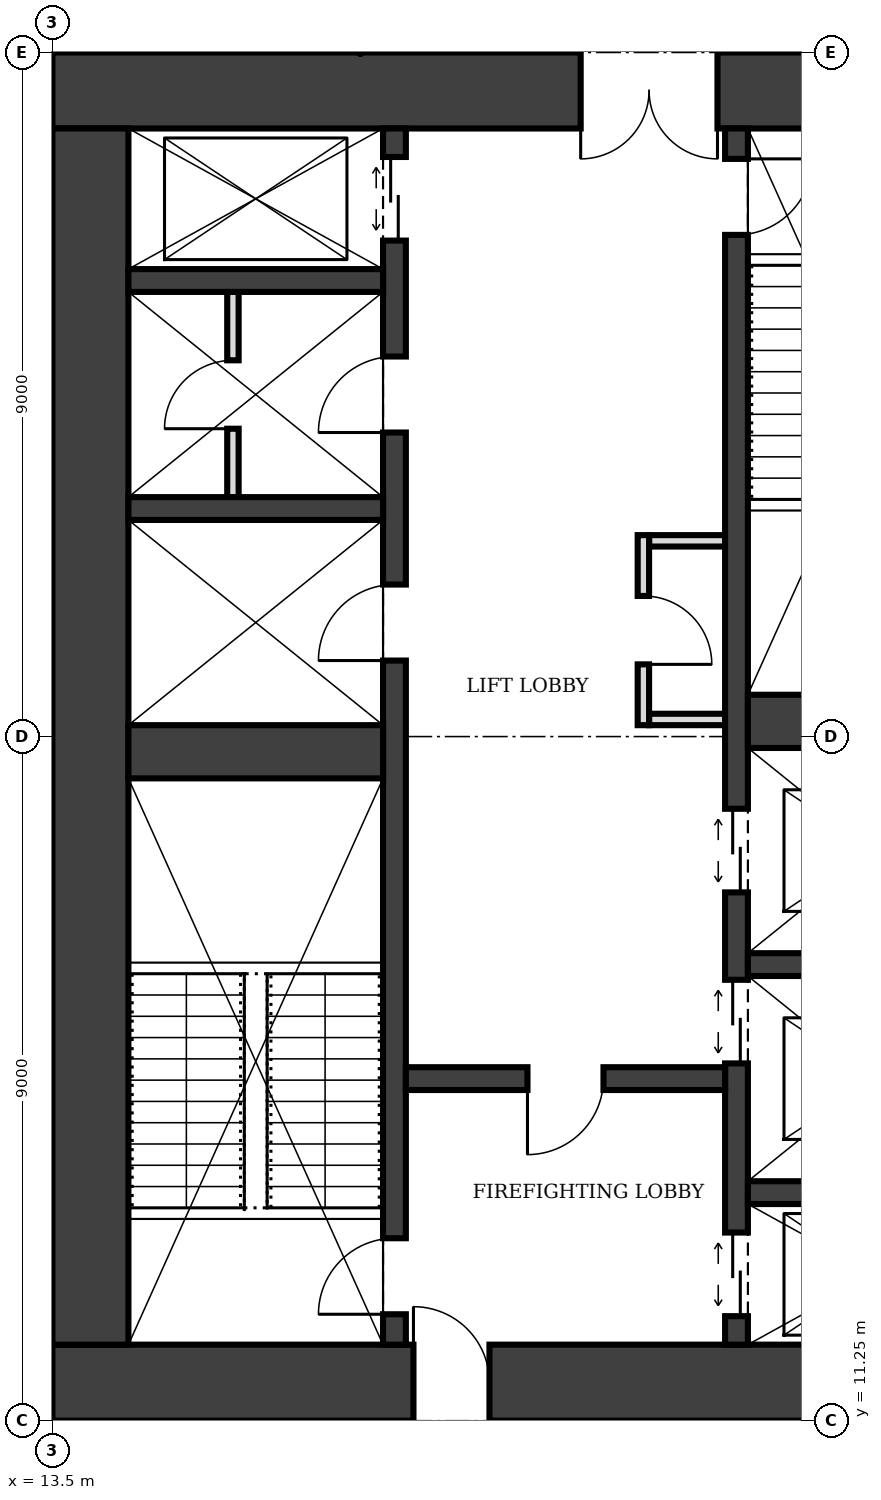
"""IFC4 building model, lengths in metres.
Left out: names, types, materials, properties, quantities, classifications, styles, units other than length and angle.
Written with IfcOpenShell. Run it as: python <this file> out.ifc"""

import sys

from ifc_helpers import new_model, si_unit, direction, frame, frame_2d, origin, place, context, subcontext, project, spatial, rectangle, extrude, element, fill, save


model = new_model("IFC4")
c1 = context("Model", 3, precision=1e-05, world=origin(), true_north=direction((0.0, 1.0)))
c2 = subcontext(c1, "Body", "Model", "MODEL_VIEW")
j1 = project(units=[si_unit("LENGTHUNIT", "METRE"), si_unit("PLANEANGLEUNIT", "RADIAN")], contexts=[c1])
p1 = place(None, origin())
s1 = spatial("IfcSite", under=j1, at=p1, CompositionType="ELEMENT")
p2 = place(p1, origin())
s2 = spatial("IfcBuilding", under=s1, at=p2, CompositionType="ELEMENT")
p3 = place(p2, frame((0.0, 0.0, 237.0)))
s3 = spatial("IfcBuildingStorey", under=s2, at=p3, CompositionType="ELEMENT", Elevation=237.0)
p4 = place(p3, frame((13.5, 11.75, 0.0), z_axis=(0.0, 0.0, 1.0), x_axis=(1.0, 0.0, 0.0)))
e1 = element("IfcWall", 1, at=p4, inside=s3, PredefinedType="SHEAR", context=c2, shape_type="SweptSolid", body=[
    extrude(rectangle(XDim=13.5, YDim=1.0, at=frame_2d((6.75, 0.0))), origin(), (0.0, 0.0, 1.0), 4.0),
])
p5 = place(p4, frame((4.75, 0.0, 0.0)))
e2 = element("IfcOpeningElement", 2, at=p5, cuts=e1, PredefinedType="OPENING", context=c2, shape_type="SweptSolid", body=[
    extrude(rectangle(XDim=1.0, YDim=2.1, at=frame_2d((0.5, 1.05))), frame((0.0, 0.51, 0.0), z_axis=(0.0, -1.0, 0.0), x_axis=(1.0, 0.0, 0.0)), (0.0, 0.0, 1.0), 1.02),
])
p6 = place(p3, frame((27.0, 28.75, 0.0), z_axis=(0.0, 0.0, 1.0), x_axis=(-1.0, 0.0, 0.0)))
e3 = element("IfcWall", 3, at=p6, inside=s3, PredefinedType="SHEAR", context=c2, shape_type="SweptSolid", body=[
    extrude(rectangle(XDim=13.5, YDim=1.0, at=frame_2d((6.75, 0.0))), origin(), (0.0, 0.0, 1.0), 4.0),
])
p7 = place(p6, frame((4.75, 0.0, 0.0)))
e4 = element("IfcOpeningElement", 4, at=p7, cuts=e3, PredefinedType="OPENING", context=c2, shape_type="SweptSolid", body=[
    extrude(rectangle(XDim=1.8, YDim=2.1, at=frame_2d((0.9, 1.05))), frame((0.0, 0.51, 0.0), z_axis=(0.0, -1.0, 0.0), x_axis=(1.0, 0.0, 0.0)), (0.0, 0.0, 1.0), 1.02),
])
p8 = place(p3, frame((14.0, 28.25, 0.0), z_axis=(0.0, 0.0, 1.0), x_axis=(0.0, -1.0, 0.0)))
e5 = element("IfcWall", 5, at=p8, inside=s3, PredefinedType="SHEAR", context=c2, shape_type="SweptSolid", body=[
    extrude(rectangle(XDim=16.0, YDim=1.0, at=frame_2d((8.0, 0.0))), origin(), (0.0, 0.0, 1.0), 4.0),
])
p9 = place(p3, frame((18.0, 12.25, 0.0), z_axis=(0.0, 0.0, 1.0), x_axis=(0.0, 1.0, 0.0)))
e6 = element("IfcWall", 6, at=p9, inside=s3, PredefinedType="SHEAR", context=c2, shape_type="SweptSolid", body=[
    extrude(rectangle(XDim=16.0, YDim=0.3, at=frame_2d((8.0, 0.0))), origin(), (0.0, 0.0, 1.0), 4.0),
])
p10 = place(p9, frame((0.4, 0.0, 0.0)))
e7 = element("IfcOpeningElement", 7, at=p10, cuts=e6, PredefinedType="OPENING", context=c2, shape_type="SweptSolid", body=[
    extrude(rectangle(XDim=1.0, YDim=2.1, at=frame_2d((0.5, 1.05))), frame((0.0, 0.16, 0.0), z_axis=(0.0, -1.0, 0.0), x_axis=(1.0, 0.0, 0.0)), (0.0, 0.0, 1.0), 0.32),
])
p11 = place(p9, frame((14.525, 0.0, 0.0)))
e8 = element("IfcOpeningElement", 8, at=p11, cuts=e6, PredefinedType="OPENING", context=c2, shape_type="SweptSolid", body=[
    extrude(rectangle(XDim=1.1, YDim=2.1, at=frame_2d((0.55, 1.05))), frame((0.0, 0.16, 0.0), z_axis=(0.0, -1.0, 0.0), x_axis=(1.0, 0.0, 0.0)), (0.0, 0.0, 1.0), 0.32),
])
p12 = place(p9, frame((9.0, 0.0, 0.0)))
e9 = element("IfcOpeningElement", 9, at=p12, cuts=e6, PredefinedType="OPENING", context=c2, shape_type="SweptSolid", body=[
    extrude(rectangle(XDim=1.0, YDim=2.1, at=frame_2d((0.5, 1.05))), frame((0.0, 0.16, 0.0), z_axis=(0.0, -1.0, 0.0), x_axis=(1.0, 0.0, 0.0)), (0.0, 0.0, 1.0), 0.32),
])
p13 = place(p9, frame((12.0, 0.0, 0.0)))
e10 = element("IfcOpeningElement", 10, at=p13, cuts=e6, PredefinedType="OPENING", context=c2, shape_type="SweptSolid", body=[
    extrude(rectangle(XDim=1.0, YDim=2.1, at=frame_2d((0.5, 1.05))), frame((0.0, 0.16, 0.0), z_axis=(0.0, -1.0, 0.0), x_axis=(1.0, 0.0, 0.0)), (0.0, 0.0, 1.0), 0.32),
])
p14 = place(p3, frame((22.5, 12.25, 0.0), z_axis=(0.0, 0.0, 1.0), x_axis=(0.0, 1.0, 0.0)))
e11 = element("IfcWall", 11, at=p14, inside=s3, PredefinedType="SHEAR", context=c2, shape_type="SweptSolid", body=[
    extrude(rectangle(XDim=16.0, YDim=0.3, at=frame_2d((8.0, 0.0))), origin(), (0.0, 0.0, 1.0), 4.0),
])
p15 = place(p14, frame((14.6, 0.0, 0.0)))
e12 = element("IfcOpeningElement", 12, at=p15, cuts=e11, PredefinedType="OPENING", context=c2, shape_type="SweptSolid", body=[
    extrude(rectangle(XDim=1.0, YDim=2.1, at=frame_2d((0.5, 1.05))), frame((0.0, 0.16, 0.0), z_axis=(0.0, -1.0, 0.0), x_axis=(1.0, 0.0, 0.0)), (0.0, 0.0, 1.0), 0.32),
])
p16 = place(p14, frame((0.375, 0.0, 0.0)))
e13 = element("IfcOpeningElement", 13, at=p16, cuts=e11, PredefinedType="OPENING", context=c2, shape_type="SweptSolid", body=[
    extrude(rectangle(XDim=1.1, YDim=2.1, at=frame_2d((0.55, 1.05))), frame((0.0, 0.16, 0.0), z_axis=(0.0, -1.0, 0.0), x_axis=(1.0, 0.0, 0.0)), (0.0, 0.0, 1.0), 0.32),
])
p17 = place(p14, frame((3.7, 0.0, 0.0)))
e14 = element("IfcOpeningElement", 14, at=p17, cuts=e11, PredefinedType="OPENING", context=c2, shape_type="SweptSolid", body=[
    extrude(rectangle(XDim=1.1, YDim=2.1, at=frame_2d((0.55, 1.05))), frame((0.0, 0.16, 0.0), z_axis=(0.0, -1.0, 0.0), x_axis=(1.0, 0.0, 0.0)), (0.0, 0.0, 1.0), 0.32),
])
p18 = place(p14, frame((5.95, 0.0, 0.0)))
e15 = element("IfcOpeningElement", 15, at=p18, cuts=e11, PredefinedType="OPENING", context=c2, shape_type="SweptSolid", body=[
    extrude(rectangle(XDim=1.1, YDim=2.1, at=frame_2d((0.55, 1.05))), frame((0.0, 0.16, 0.0), z_axis=(0.0, -1.0, 0.0), x_axis=(1.0, 0.0, 0.0)), (0.0, 0.0, 1.0), 0.32),
])
p19 = place(p3, frame((14.5, 20.05, 0.0), z_axis=(0.0, 0.0, 1.0), x_axis=(1.0, 0.0, 0.0)))
e16 = element("IfcWall", 16, at=p19, inside=s3, PredefinedType="SHEAR", context=c2, shape_type="SweptSolid", body=[
    extrude(rectangle(XDim=3.35, YDim=0.7, at=frame_2d((1.675, 0.0))), origin(), (0.0, 0.0, 1.0), 4.0),
])
p20 = place(p3, frame((18.15, 15.75, 0.0), z_axis=(0.0, 0.0, 1.0), x_axis=(1.0, 0.0, 0.0)))
e17 = element("IfcWall", 17, at=p20, inside=s3, PredefinedType="SHEAR", context=c2, shape_type="SweptSolid", body=[
    extrude(rectangle(XDim=4.2, YDim=0.3, at=frame_2d((2.1, 0.0))), origin(), (0.0, 0.0, 1.0), 4.0),
])
p21 = place(p20, frame((1.6, 0.0, 0.0)))
e18 = element("IfcOpeningElement", 18, at=p21, cuts=e17, PredefinedType="OPENING", context=c2, shape_type="SweptSolid", body=[
    extrude(rectangle(XDim=1.0, YDim=2.1, at=frame_2d((0.5, 1.05))), frame((0.0, 0.16, 0.0), z_axis=(0.0, -1.0, 0.0), x_axis=(1.0, 0.0, 0.0)), (0.0, 0.0, 1.0), 0.32),
])
for number, where, z_axis, x_axis in (
    (19, (22.65, 14.25, 0.0), (0.0, 0.0, 1.0), (1.0, 0.0, 0.0)),
    (20, (22.65, 17.25, 0.0), (0.0, 0.0, 1.0), (1.0, 0.0, 0.0)),
):
    element("IfcWall", number, at=place(p3, frame(where, z_axis=z_axis, x_axis=x_axis)), inside=s3, PredefinedType="SHEAR", context=c2, shape_type="SweptSolid", body=[
        extrude(rectangle(XDim=3.35, YDim=0.3, at=frame_2d((1.675, 0.0))), origin(), (0.0, 0.0, 1.0), 4.0),
    ])
p22 = place(p3, frame((22.65, 20.45, 0.0), z_axis=(0.0, 0.0, 1.0), x_axis=(1.0, 0.0, 0.0)))
e21 = element("IfcWall", 21, at=p22, inside=s3, PredefinedType="SHEAR", context=c2, shape_type="SweptSolid", body=[
    extrude(rectangle(XDim=3.35, YDim=0.7, at=frame_2d((1.675, 0.0))), origin(), (0.0, 0.0, 1.0), 4.0),
])
for number, where, z_axis, x_axis in (
    (22, (14.5, 23.25, 0.0), (0.0, 0.0, 1.0), (1.0, 0.0, 0.0)),
    (23, (14.5, 26.25, 0.0), (0.0, 0.0, 1.0), (1.0, 0.0, 0.0)),
):
    element("IfcWall", number, at=place(p3, frame(where, z_axis=z_axis, x_axis=x_axis)), inside=s3, PredefinedType="SHEAR", context=c2, shape_type="SweptSolid", body=[
        extrude(rectangle(XDim=3.35, YDim=0.3, at=frame_2d((1.675, 0.0))), origin(), (0.0, 0.0, 1.0), 4.0),
    ])
p23 = place(p3, frame((21.275, 20.4, 0.0), z_axis=(0.0, 0.0, 1.0), x_axis=(0.0, 1.0, 0.0)))
e24 = element("IfcWall", 24, at=p23, inside=s3, PredefinedType="PARTITIONING", context=c2, shape_type="SweptSolid", body=[
    extrude(rectangle(XDim=2.5, YDim=0.15, at=frame_2d((1.25, 0.0))), origin(), (0.0, 0.0, 1.0), 3.75),
])
p24 = place(p23, frame((0.8, 0.0, 0.0)))
e25 = element("IfcOpeningElement", 25, at=p24, cuts=e24, PredefinedType="OPENING", context=c2, shape_type="SweptSolid", body=[
    extrude(rectangle(XDim=0.9, YDim=2.1, at=frame_2d((0.45, 1.05))), frame((0.0, 0.085, 0.0), z_axis=(0.0, -1.0, 0.0), x_axis=(1.0, 0.0, 0.0)), (0.0, 0.0, 1.0), 0.17),
])
for number, where, z_axis, x_axis in (
    (26, (21.35, 20.475, 0.0), (0.0, 0.0, 1.0), (1.0, 0.0, 0.0)),
    (27, (21.35, 22.825, 0.0), (0.0, 0.0, 1.0), (1.0, 0.0, 0.0)),
):
    element("IfcWall", number, at=place(p3, frame(where, z_axis=z_axis, x_axis=x_axis)), inside=s3, PredefinedType="PARTITIONING", context=c2, shape_type="SweptSolid", body=[
        extrude(rectangle(XDim=1.0, YDim=0.15, at=frame_2d((0.5, 0.0))), origin(), (0.0, 0.0, 1.0), 3.75),
    ])
p25 = place(p3, frame((15.875, 23.4, 0.0), z_axis=(0.0, 0.0, 1.0), x_axis=(0.0, 1.0, 0.0)))
e28 = element("IfcWall", 28, at=p25, inside=s3, PredefinedType="PARTITIONING", context=c2, shape_type="SweptSolid", body=[
    extrude(rectangle(XDim=2.7, YDim=0.15, at=frame_2d((1.35, 0.0))), origin(), (0.0, 0.0, 1.0), 3.75),
])
p26 = place(p25, frame((0.9, 0.0, 0.0)))
e29 = element("IfcOpeningElement", 29, at=p26, cuts=e28, PredefinedType="OPENING", context=c2, shape_type="SweptSolid", body=[
    extrude(rectangle(XDim=0.9, YDim=2.1, at=frame_2d((0.45, 1.05))), frame((0.0, 0.085, 0.0), z_axis=(0.0, -1.0, 0.0), x_axis=(1.0, 0.0, 0.0)), (0.0, 0.0, 1.0), 0.17),
])
p27 = place(p5, origin())
e30 = element("IfcDoor", 30, at=p27, inside=s3, OperationType="SINGLE_SWING_LEFT", PredefinedType="DOOR", context=c2, shape_type="SweptSolid", body=[
    extrude(rectangle(XDim=1.0, YDim=2.1, at=frame_2d((0.5, 1.05))), frame((0.0, 0.025, 0.0), z_axis=(0.0, -1.0, 0.0), x_axis=(1.0, 0.0, 0.0)), (0.0, 0.0, 1.0), 0.05),
])
fill(e2, e30)
p28 = place(p7, origin())
e31 = element("IfcDoor", 31, at=p28, inside=s3, OperationType="DOUBLE_DOOR_SINGLE_SWING", PredefinedType="DOOR", context=c2, shape_type="SweptSolid", body=[
    extrude(rectangle(XDim=1.8, YDim=2.1, at=frame_2d((0.9, 1.05))), frame((0.0, 0.025, 0.0), z_axis=(0.0, -1.0, 0.0), x_axis=(1.0, 0.0, 0.0)), (0.0, 0.0, 1.0), 0.05),
])
fill(e4, e31)
p29 = place(p21, frame((1.0, 0.0, 0.0), z_axis=(0.0, 0.0, 1.0), x_axis=(-1.0, 0.0, 0.0)))
e32 = element("IfcDoor", 32, at=p29, inside=s3, OperationType="SINGLE_SWING_RIGHT", PredefinedType="DOOR", context=c2, shape_type="SweptSolid", body=[
    extrude(rectangle(XDim=1.0, YDim=2.1, at=frame_2d((0.5, 1.05))), frame((0.0, 0.025, 0.0), z_axis=(0.0, -1.0, 0.0), x_axis=(1.0, 0.0, 0.0)), (0.0, 0.0, 1.0), 0.05),
])
fill(e18, e32)
p30 = place(p10, origin())
e33 = element("IfcDoor", 33, at=p30, inside=s3, OperationType="SINGLE_SWING_LEFT", PredefinedType="DOOR", context=c2, shape_type="SweptSolid", body=[
    extrude(rectangle(XDim=1.0, YDim=2.1, at=frame_2d((0.5, 1.05))), frame((0.0, 0.025, 0.0), z_axis=(0.0, -1.0, 0.0), x_axis=(1.0, 0.0, 0.0)), (0.0, 0.0, 1.0), 0.05),
])
fill(e7, e33)
p31 = place(p15, frame((1.0, 0.0, 0.0), z_axis=(0.0, 0.0, 1.0), x_axis=(-1.0, 0.0, 0.0)))
e34 = element("IfcDoor", 34, at=p31, inside=s3, OperationType="SINGLE_SWING_LEFT", PredefinedType="DOOR", context=c2, shape_type="SweptSolid", body=[
    extrude(rectangle(XDim=1.0, YDim=2.1, at=frame_2d((0.5, 1.05))), frame((0.0, 0.025, 0.0), z_axis=(0.0, -1.0, 0.0), x_axis=(1.0, 0.0, 0.0)), (0.0, 0.0, 1.0), 0.05),
])
fill(e12, e34)
p32 = place(p16, origin())
e35 = element("IfcDoor", 35, at=p32, inside=s3, OperationType="DOUBLE_DOOR_SLIDING", PredefinedType="DOOR", context=c2, shape_type="SweptSolid", body=[
    extrude(rectangle(XDim=1.1, YDim=2.1, at=frame_2d((0.55, 1.05))), frame((0.0, 0.025, 0.0), z_axis=(0.0, -1.0, 0.0), x_axis=(1.0, 0.0, 0.0)), (0.0, 0.0, 1.0), 0.05),
])
fill(e13, e35)
p33 = place(p11, origin())
e36 = element("IfcDoor", 36, at=p33, inside=s3, OperationType="DOUBLE_DOOR_SLIDING", PredefinedType="DOOR", context=c2, shape_type="SweptSolid", body=[
    extrude(rectangle(XDim=1.1, YDim=2.1, at=frame_2d((0.55, 1.05))), frame((0.0, 0.025, 0.0), z_axis=(0.0, -1.0, 0.0), x_axis=(1.0, 0.0, 0.0)), (0.0, 0.0, 1.0), 0.05),
])
fill(e8, e36)
p34 = place(p17, origin())
e37 = element("IfcDoor", 37, at=p34, inside=s3, OperationType="DOUBLE_DOOR_SLIDING", PredefinedType="DOOR", context=c2, shape_type="SweptSolid", body=[
    extrude(rectangle(XDim=1.1, YDim=2.1, at=frame_2d((0.55, 1.05))), frame((0.0, 0.025, 0.0), z_axis=(0.0, -1.0, 0.0), x_axis=(1.0, 0.0, 0.0)), (0.0, 0.0, 1.0), 0.05),
])
fill(e14, e37)
p35 = place(p18, origin())
e38 = element("IfcDoor", 38, at=p35, inside=s3, OperationType="DOUBLE_DOOR_SLIDING", PredefinedType="DOOR", context=c2, shape_type="SweptSolid", body=[
    extrude(rectangle(XDim=1.1, YDim=2.1, at=frame_2d((0.55, 1.05))), frame((0.0, 0.025, 0.0), z_axis=(0.0, -1.0, 0.0), x_axis=(1.0, 0.0, 0.0)), (0.0, 0.0, 1.0), 0.05),
])
fill(e15, e38)
p36 = place(p24, frame((0.9, 0.0, 0.0), z_axis=(0.0, 0.0, 1.0), x_axis=(-1.0, 0.0, 0.0)))
e39 = element("IfcDoor", 39, at=p36, inside=s3, OperationType="SINGLE_SWING_RIGHT", PredefinedType="DOOR", context=c2, shape_type="SweptSolid", body=[
    extrude(rectangle(XDim=0.9, YDim=2.1, at=frame_2d((0.45, 1.05))), frame((0.0, 0.025, 0.0), z_axis=(0.0, -1.0, 0.0), x_axis=(1.0, 0.0, 0.0)), (0.0, 0.0, 1.0), 0.05),
])
fill(e25, e39)
p37 = place(p12, origin())
e40 = element("IfcDoor", 40, at=p37, inside=s3, OperationType="SINGLE_SWING_LEFT", PredefinedType="DOOR", context=c2, shape_type="SweptSolid", body=[
    extrude(rectangle(XDim=1.0, YDim=2.1, at=frame_2d((0.5, 1.05))), frame((0.0, 0.025, 0.0), z_axis=(0.0, -1.0, 0.0), x_axis=(1.0, 0.0, 0.0)), (0.0, 0.0, 1.0), 0.05),
])
fill(e9, e40)
p38 = place(p13, origin())
e41 = element("IfcDoor", 41, at=p38, inside=s3, OperationType="SINGLE_SWING_LEFT", PredefinedType="DOOR", context=c2, shape_type="SweptSolid", body=[
    extrude(rectangle(XDim=1.0, YDim=2.1, at=frame_2d((0.5, 1.05))), frame((0.0, 0.025, 0.0), z_axis=(0.0, -1.0, 0.0), x_axis=(1.0, 0.0, 0.0)), (0.0, 0.0, 1.0), 0.05),
])
fill(e10, e41)
p39 = place(p26, origin())
e42 = element("IfcDoor", 42, at=p39, inside=s3, OperationType="SINGLE_SWING_LEFT", PredefinedType="DOOR", context=c2, shape_type="SweptSolid", body=[
    extrude(rectangle(XDim=0.9, YDim=2.1, at=frame_2d((0.45, 1.05))), frame((0.0, 0.025, 0.0), z_axis=(0.0, -1.0, 0.0), x_axis=(1.0, 0.0, 0.0)), (0.0, 0.0, 1.0), 0.05),
])
fill(e29, e42)
save(model, sys.argv[1])
